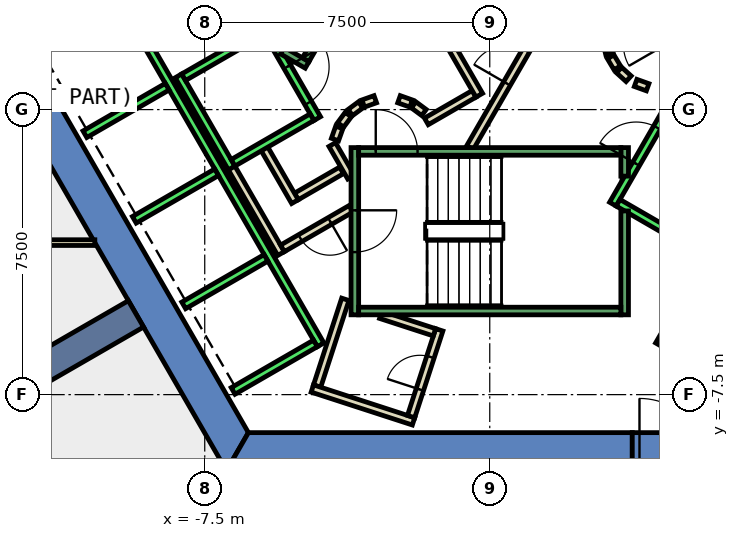
"""IFC4 building model, lengths in metres.
Left out: names, types, materials, properties, quantities, classifications, styles, units other than length and angle.
Written with IfcOpenShell. Run it as: python <this file> out.ifc"""

import sys

from ifc_helpers import new_model, si_unit, direction, frame, frame_2d, origin, place, context, subcontext, project, spatial, polyline, rectangle, outline, extrude, element, fill, save


model = new_model("IFC4")
c1 = context("Model", 3, precision=1e-05, world=origin(), true_north=direction((0.0, 1.0)))
c2 = subcontext(c1, "Body", "Model", "MODEL_VIEW")
j1 = project(units=[si_unit("LENGTHUNIT", "METRE"), si_unit("PLANEANGLEUNIT", "RADIAN")], contexts=[c1])
p1 = place(None, origin())
s1 = spatial("IfcSite", under=j1, at=p1, CompositionType="ELEMENT")
p2 = place(p1, origin())
s2 = spatial("IfcBuilding", under=s1, at=p2, CompositionType="ELEMENT")
p3 = place(p2, frame((0.0, 0.0, 25.0)))
s3 = spatial("IfcBuildingStorey", under=s2, at=p3, CompositionType="ELEMENT", Elevation=25.0)
p4 = place(p3, frame((0.0, 0.0, -0.45)))
e1 = element("IfcWall", 1, at=p4, inside=s3, PredefinedType="SHEAR", context=c2, shape_type="SweptSolid", body=[
    extrude(outline(polyline([(-13.856, 2.5), (-6.928, -9.5), (-6.351, -8.5), (-12.702, 2.5), (-13.856, 2.5)])), origin(), (0.0, 0.0, 1.0), 5.0),
])
p5 = place(p3, frame((0.0, 0.0, -0.45)))
e2 = element("IfcWall", 2, at=p5, inside=s3, PredefinedType="SHEAR", context=c2, shape_type="SweptSolid", body=[
    extrude(outline(polyline([(3.75, -9.5), (3.75, -8.5), (-6.351, -8.5), (-6.928, -9.5), (3.75, -9.5)])), origin(), (0.0, 0.0, 1.0), 5.0),
])
p6 = place(p3, frame((0.0, 0.0, 3.6)))
e3 = element("IfcWall", 3, at=p6, inside=s3, PredefinedType="SHEAR", context=c2, shape_type="SweptSolid", body=[
    extrude(outline(polyline([(5.75, -9.5), (5.75, -8.5), (3.75, -8.5), (3.75, -9.5), (5.75, -9.5)])), origin(), (0.0, 0.0, 1.0), 0.95),
])
p7 = place(p3, frame((-9.31, -5.375, -0.45), z_axis=(0.0, 0.0, 1.0), x_axis=(-0.866017533419, -0.500013631625, 0.0)))
e4 = element("IfcWall", 4, at=p7, inside=s3, PredefinedType="SHEAR", context=c2, shape_type="SweptSolid", body=[
    extrude(rectangle(XDim=9.0, YDim=0.8, at=frame_2d((4.5, 0.0))), origin(), (0.0, 0.0, 1.0), 5.0),
])
p8 = place(p3, frame((-3.9, -1.599, 0.0), z_axis=(0.0, 0.0, 1.0), x_axis=(-0.865969445389, -0.500096910261, 0.0)))
e5 = element("IfcWall", 5, at=p8, inside=s3, PredefinedType="PARTITIONING", context=c2, shape_type="SweptSolid", body=[
    extrude(rectangle(XDim=1.373, YDim=0.2, at=frame_2d((0.687, 0.0))), origin(), (0.0, 0.0, 1.0), 4.55),
])
p9 = place(p3, frame((-5.126, -2.422, 0.0), z_axis=(0.0, 0.0, 1.0), x_axis=(-0.500062241894, 0.865989465428, 0.0)))
e6 = element("IfcWall", 6, at=p9, inside=s3, PredefinedType="PARTITIONING", context=c2, shape_type="SweptSolid", body=[
    extrude(rectangle(XDim=1.7, YDim=0.2, at=frame_2d((0.85, 0.0))), origin(), (0.0, 0.0, 1.0), 4.55),
])
p10 = place(p3, frame((-5.492, -3.788, 0.0), z_axis=(0.0, 0.0, 1.0), x_axis=(-0.500008949224, 0.866020236886, 0.0)))
e7 = element("IfcWall", 7, at=p10, inside=s3, PredefinedType="PARTITIONING", context=c2, shape_type="SweptSolid", body=[
    extrude(rectangle(XDim=2.68, YDim=0.2, at=frame_2d((1.34, 0.0))), origin(), (0.0, 0.0, 1.0), 4.55),
])
p11 = place(p3, frame((-4.145, -0.92, 0.0), z_axis=(0.0, 0.0, 1.0), x_axis=(0.499743786207, -0.866173278362, 0.0)))
e8 = element("IfcWall", 8, at=p11, inside=s3, PredefinedType="PARTITIONING", context=c2, shape_type="SweptSolid", body=[
    extrude(rectangle(XDim=0.991, YDim=0.2, at=frame_2d((0.495, 0.0))), origin(), (0.0, 0.0, 1.0), 4.55),
])
p12 = place(p3, frame((-3.65, -2.61, 0.0), z_axis=(0.0, 0.0, 1.0), x_axis=(-0.866072462134, -0.499918483688, 0.0)))
e9 = element("IfcWall", 9, at=p12, inside=s3, PredefinedType="PARTITIONING", context=c2, shape_type="SweptSolid", body=[
    extrude(rectangle(XDim=2.084, YDim=0.2, at=frame_2d((1.042, 0.0))), origin(), (0.0, 0.0, 1.0), 4.55),
])
p13 = place(p12, frame((0.642, 0.0, 0.0)))
e10 = element("IfcOpeningElement", 10, at=p13, cuts=e9, PredefinedType="OPENING", context=c2, shape_type="SweptSolid", body=[
    extrude(rectangle(XDim=0.9, YDim=2.1, at=frame_2d((0.45, 1.05))), frame((0.0, 0.11, 0.0), z_axis=(0.0, -1.0, 0.0), x_axis=(1.0, 0.0, 0.0)), (0.0, 0.0, 1.0), 0.22),
])
p14 = place(p3, frame((-3.801, -4.992, 0.0), z_axis=(0.0, 0.0, 1.0), x_axis=(-0.309079173229, -0.951036310914, 0.0)))
e11 = element("IfcWall", 11, at=p14, inside=s3, PredefinedType="PARTITIONING", context=c2, shape_type="SweptSolid", body=[
    extrude(rectangle(XDim=2.4, YDim=0.2, at=frame_2d((1.2, 0.0))), origin(), (0.0, 0.0, 1.0), 4.55),
])
p15 = place(p3, frame((-4.669, -7.339, 0.0), z_axis=(0.0, 0.0, 1.0), x_axis=(0.951079555704, -0.308946077369, 0.0)))
e12 = element("IfcWall", 12, at=p15, inside=s3, PredefinedType="PARTITIONING", context=c2, shape_type="SweptSolid", body=[
    extrude(rectangle(XDim=2.8, YDim=0.2, at=frame_2d((1.4, 0.0))), origin(), (0.0, 0.0, 1.0), 4.55),
])
p16 = place(p3, frame((-2.07, -8.078, 0.0), z_axis=(0.0, 0.0, 1.0), x_axis=(0.309171157328, 0.951006411901, 0.0)))
e13 = element("IfcWall", 13, at=p16, inside=s3, PredefinedType="PARTITIONING", context=c2, shape_type="SweptSolid", body=[
    extrude(rectangle(XDim=2.401, YDim=0.2, at=frame_2d((1.2, 0.0))), origin(), (0.0, 0.0, 1.0), 4.55),
])
p17 = place(p16, frame((0.75, 0.0, 0.0)))
e14 = element("IfcOpeningElement", 14, at=p17, cuts=e13, PredefinedType="OPENING", context=c2, shape_type="SweptSolid", body=[
    extrude(rectangle(XDim=0.9, YDim=2.1, at=frame_2d((0.45, 1.05))), frame((0.0, 0.11, 0.0), z_axis=(0.0, -1.0, 0.0), x_axis=(1.0, 0.0, 0.0)), (0.0, 0.0, 1.0), 0.22),
])
p18 = place(p3, frame((-1.455, -5.86, 0.0), z_axis=(0.0, 0.0, 1.0), x_axis=(-0.950892787506, 0.309520446287, 0.0)))
e15 = element("IfcWall", 15, at=p18, inside=s3, PredefinedType="PARTITIONING", context=c2, shape_type="SweptSolid", body=[
    extrude(rectangle(XDim=1.487, YDim=0.2, at=frame_2d((0.743, 0.0))), origin(), (0.0, 0.0, 1.0), 4.55),
])
p19 = place(p3, frame((3.07, 1.786, 0.0), z_axis=(0.0, 0.0, 1.0), x_axis=(0.242705583207, -0.970099994784, 0.0)))
e16 = element("IfcWall", 16, at=p19, inside=s3, PredefinedType="PARTITIONING", context=c2, shape_type="SweptSolid", body=[
    extrude(rectangle(XDim=0.338, YDim=0.2, at=frame_2d((0.169, 0.0))), origin(), (0.0, 0.0, 1.0), 4.55),
])
for number, where, z_axis, x_axis in (
    (17, (3.182, 1.388, 0.0), (0.0, 0.0, 1.0), (0.512, -0.859, 0.0)),
    (18, (3.404, 1.039, 0.0), (0.0, 0.0, 1.0), (0.74, -0.672, 0.0)),
):
    element("IfcWall", number, at=place(p3, frame(where, z_axis=z_axis, x_axis=x_axis)), inside=s3, PredefinedType="PARTITIONING", context=c2, shape_type="SweptSolid", body=[
        extrude(rectangle(XDim=0.338, YDim=0.2, at=frame_2d((0.169, 0.0))), origin(), (0.0, 0.0, 1.0), 4.55),
    ])
p20 = place(p3, frame((3.838, 0.702, 0.0), z_axis=(0.0, 0.0, 1.0), x_axis=(0.941035081519, -0.338308993895, 0.0)))
e19 = element("IfcWall", 19, at=p20, inside=s3, PredefinedType="PARTITIONING", context=c2, shape_type="SweptSolid", body=[
    extrude(rectangle(XDim=0.337, YDim=0.2, at=frame_2d((0.168, 0.0))), origin(), (0.0, 0.0, 1.0), 4.55),
])
p21 = place(p3, frame((-0.52, -1.0, 0.0), z_axis=(0.0, 0.0, 1.0), x_axis=(0.50011622646, 0.865958290007, 0.0)))
e20 = element("IfcWall", 20, at=p21, inside=s3, PredefinedType="PARTITIONING", context=c2, shape_type="SweptSolid", body=[
    extrude(rectangle(XDim=4.991, YDim=0.2, at=frame_2d((2.496, 0.0))), origin(), (0.0, 0.0, 1.0), 4.55),
])
p22 = place(p21, frame((1.945, 0.0, 0.0)))
e21 = element("IfcOpeningElement", 21, at=p22, cuts=e20, PredefinedType="OPENING", context=c2, shape_type="SweptSolid", body=[
    extrude(rectangle(XDim=1.0, YDim=2.1, at=frame_2d((0.5, 1.05))), frame((0.0, 0.11, 0.0), z_axis=(0.0, -1.0, 0.0), x_axis=(1.0, 0.0, 0.0)), (0.0, 0.0, 1.0), 0.22),
])
p23 = place(p3, frame((-0.412, 0.414, 0.0), z_axis=(0.0, 0.0, 1.0), x_axis=(-0.866017369001, -0.500013916395, 0.0)))
e22 = element("IfcWall", 22, at=p23, inside=s3, PredefinedType="PARTITIONING", context=c2, shape_type="SweptSolid", body=[
    extrude(rectangle(XDim=1.45, YDim=0.2, at=frame_2d((0.725, 0.0))), origin(), (0.0, 0.0, 1.0), 4.55),
])
p24 = place(p3, frame((-1.731, -0.077, 0.0), z_axis=(0.0, 0.0, 1.0), x_axis=(-0.804311165252, 0.594208338422, 0.0)))
e23 = element("IfcWall", 23, at=p24, inside=s3, PredefinedType="PARTITIONING", context=c2, shape_type="SweptSolid", body=[
    extrude(rectangle(XDim=0.338, YDim=0.2, at=frame_2d((0.169, 0.0))), origin(), (0.0, 0.0, 1.0), 4.55),
])
p25 = place(p3, frame((-2.07, 0.16, 0.0), z_axis=(0.0, 0.0, 1.0), x_axis=(-0.942199461132, 0.335052496547, 0.0)))
e24 = element("IfcWall", 24, at=p25, inside=s3, PredefinedType="PARTITIONING", context=c2, shape_type="SweptSolid", body=[
    extrude(rectangle(XDim=0.337, YDim=0.2, at=frame_2d((0.169, 0.0))), origin(), (0.0, 0.0, 1.0), 4.55),
])
p26 = place(p3, frame((-3.012, 0.273, 0.0), z_axis=(0.0, 0.0, 1.0), x_axis=(-0.942280615813, -0.334824194261, 0.0)))
e25 = element("IfcWall", 25, at=p26, inside=s3, PredefinedType="PARTITIONING", context=c2, shape_type="SweptSolid", body=[
    extrude(rectangle(XDim=0.338, YDim=0.2, at=frame_2d((0.169, 0.0))), origin(), (0.0, 0.0, 1.0), 4.55),
])
p27 = place(p3, frame((-3.397, 0.124, 0.0), z_axis=(0.0, 0.0, 1.0), x_axis=(-0.804311165252, -0.594208338422, 0.0)))
e26 = element("IfcWall", 26, at=p27, inside=s3, PredefinedType="PARTITIONING", context=c2, shape_type="SweptSolid", body=[
    extrude(rectangle(XDim=0.338, YDim=0.2, at=frame_2d((0.169, 0.0))), origin(), (0.0, 0.0, 1.0), 4.55),
])
p28 = place(p3, frame((-3.723, -0.131, 0.0), z_axis=(0.0, 0.0, 1.0), x_axis=(-0.594675113454, -0.803966112121, 0.0)))
e27 = element("IfcWall", 27, at=p28, inside=s3, PredefinedType="PARTITIONING", context=c2, shape_type="SweptSolid", body=[
    extrude(rectangle(XDim=0.338, YDim=0.2, at=frame_2d((0.169, 0.0))), origin(), (0.0, 0.0, 1.0), 4.55),
])
p29 = place(p3, frame((-3.96, -0.47, 0.0), z_axis=(0.0, 0.0, 1.0), x_axis=(-0.334824194261, -0.942280615813, 0.0)))
e28 = element("IfcWall", 28, at=p29, inside=s3, PredefinedType="PARTITIONING", context=c2, shape_type="SweptSolid", body=[
    extrude(rectangle(XDim=0.338, YDim=0.2, at=frame_2d((0.169, 0.0))), origin(), (0.0, 0.0, 1.0), 4.55),
])
p30 = place(p3, frame((-2.771, 4.7, 0.0), z_axis=(0.0, 0.0, 1.0), x_axis=(0.499969479948, -0.866043023828, 0.0)))
e29 = element("IfcWall", 29, at=p30, inside=s3, PredefinedType="PARTITIONING", context=c2, shape_type="SweptSolid", body=[
    extrude(rectangle(XDim=4.99, YDim=0.2, at=frame_2d((2.495, 0.0))), origin(), (0.0, 0.0, 1.0), 4.55),
])
p31 = place(p30, frame((1.945, 0.0, 0.0)))
e30 = element("IfcOpeningElement", 30, at=p31, cuts=e29, PredefinedType="OPENING", context=c2, shape_type="SweptSolid", body=[
    extrude(rectangle(XDim=1.0, YDim=2.1, at=frame_2d((0.5, 1.05))), frame((0.0, 0.11, 0.0), z_axis=(0.0, -1.0, 0.0), x_axis=(1.0, 0.0, 0.0)), (0.0, 0.0, 1.0), 0.22),
])
p32 = place(p3, frame((-23.777, -3.5, 0.0), z_axis=(0.0, 0.0, 1.0), x_axis=(1.0, 0.0, 0.0)))
e31 = element("IfcWall", 31, at=p32, inside=s3, PredefinedType="PARTITIONING", context=c2, shape_type="SweptSolid", body=[
    extrude(rectangle(XDim=13.385, YDim=0.15, at=frame_2d((6.692, 0.0))), origin(), (0.0, 0.0, 1.0), 4.55),
])
p33 = place(p32, frame((5.83, 0.0, 0.0)))
e32 = element("IfcOpeningElement", 32, at=p33, cuts=e31, PredefinedType="OPENING", context=c2, shape_type="SweptSolid", body=[
    extrude(rectangle(XDim=1.8, YDim=2.1, at=frame_2d((0.9, 1.05))), frame((0.0, 0.085, 0.0), z_axis=(0.0, -1.0, 0.0), x_axis=(1.0, 0.0, 0.0)), (0.0, 0.0, 1.0), 0.17),
])
p34 = place(p3, frame((-5.94, 2.188, 0.0), z_axis=(0.0, 0.0, 1.0), x_axis=(0.49994636267, -0.866056369097, 0.0)))
e33 = element("IfcWall", 33, at=p34, inside=s3, PredefinedType="STANDARD", context=c2, shape_type="SweptSolid", body=[
    extrude(rectangle(XDim=2.8, YDim=0.2, at=frame_2d((1.4, 0.0))), origin(), (0.0, 0.0, 1.0), 4.55),
])
p35 = place(p34, frame((1.225, 0.0, 0.0)))
e34 = element("IfcOpeningElement", 34, at=p35, cuts=e33, PredefinedType="OPENING", context=c2, shape_type="SweptSolid", body=[
    extrude(rectangle(XDim=1.1, YDim=2.1, at=frame_2d((0.55, 1.05))), frame((0.0, 0.11, 0.0), z_axis=(0.0, -1.0, 0.0), x_axis=(1.0, 0.0, 0.0)), (0.0, 0.0, 1.0), 0.22),
])
p36 = place(p3, frame((-8.192, 0.888, 0.0), z_axis=(0.0, 0.0, 1.0), x_axis=(0.49994636267, -0.866056369097, 0.0)))
e35 = element("IfcWall", 35, at=p36, inside=s3, PredefinedType="STANDARD", context=c2, shape_type="SweptSolid", body=[
    extrude(rectangle(XDim=2.8, YDim=0.2, at=frame_2d((1.4, 0.0))), origin(), (0.0, 0.0, 1.0), 4.55),
])
for number, where, z_axis, x_axis in (
    (36, (-5.977, 2.052, 0.0), (0.0, 0.0, 1.0), (-0.866, -0.5, 0.0)),
    (37, (-4.677, -0.2, 0.0), (0.0, 0.0, 1.0), (-0.866, -0.5, 0.0)),
):
    element("IfcWall", number, at=place(p3, frame(where, z_axis=z_axis, x_axis=x_axis)), inside=s3, PredefinedType="STANDARD", context=c2, shape_type="SweptSolid", body=[
        extrude(rectangle(XDim=2.399, YDim=0.2, at=frame_2d((1.2, 0.0))), origin(), (0.0, 0.0, 1.0), 4.55),
    ])
p37 = place(p3, frame((-9.751, 2.99, 0.0), z_axis=(0.0, 0.0, 1.0), x_axis=(0.50000090737, -0.866024879913, 0.0)))
e38 = element("IfcWall", 38, at=p37, inside=s3, PredefinedType="STANDARD", context=c2, shape_type="SweptSolid", body=[
    extrude(rectangle(XDim=10.6, YDim=0.2, at=frame_2d((5.3, 0.0))), origin(), (0.0, 0.0, 1.0), 4.55),
])
for number, where, z_axis, x_axis in (
    (39, (-8.488, 0.602, 0.0), (0.0, 0.0, 1.0), (-0.866, -0.5, 0.0)),
    (40, (-7.188, -1.65, 0.0), (0.0, 0.0, 1.0), (-0.866, -0.5, 0.0)),
    (41, (-5.888, -3.902, 0.0), (0.0, 0.0, 1.0), (-0.866, -0.5, 0.0)),
    (42, (-4.588, -6.153, 0.0), (0.0, 0.0, 1.0), (-0.866, -0.5, 0.0)),
):
    element("IfcWall", number, at=place(p3, frame(where, z_axis=z_axis, x_axis=x_axis)), inside=s3, PredefinedType="STANDARD", context=c2, shape_type="SweptSolid", body=[
        extrude(rectangle(XDim=2.5, YDim=0.2, at=frame_2d((1.25, 0.0))), origin(), (0.0, 0.0, 1.0), 4.55),
    ])
p38 = place(p3, frame((3.24, -2.488, 0.0), z_axis=(0.0, 0.0, 1.0), x_axis=(0.49994636267, 0.866056369097, 0.0)))
e43 = element("IfcWall", 43, at=p38, inside=s3, PredefinedType="STANDARD", context=c2, shape_type="SweptSolid", body=[
    extrude(rectangle(XDim=2.8, YDim=0.2, at=frame_2d((1.4, 0.0))), origin(), (0.0, 0.0, 1.0), 4.55),
])
p39 = place(p38, frame((1.225, 0.0, 0.0)))
e44 = element("IfcOpeningElement", 44, at=p39, cuts=e43, PredefinedType="OPENING", context=c2, shape_type="SweptSolid", body=[
    extrude(rectangle(XDim=1.1, YDim=2.1, at=frame_2d((0.55, 1.05))), frame((0.0, 0.11, 0.0), z_axis=(0.0, -1.0, 0.0), x_axis=(1.0, 0.0, 0.0)), (0.0, 0.0, 1.0), 0.22),
])
p40 = place(p3, frame((3.377, -2.452, 0.0), z_axis=(0.0, 0.0, 1.0), x_axis=(0.865955154139, -0.50012165622, 0.0)))
e45 = element("IfcWall", 45, at=p40, inside=s3, PredefinedType="STANDARD", context=c2, shape_type="SweptSolid", body=[
    extrude(rectangle(XDim=2.4, YDim=0.2, at=frame_2d((1.2, 0.0))), origin(), (0.0, 0.0, 1.0), 4.55),
])
p41 = place(p3, frame((4.451, -6.19, 0.0), z_axis=(0.0, 0.0, 1.0), x_axis=(0.50000090737, 0.866024879913, 0.0)))
e46 = element("IfcWall", 46, at=p41, inside=s3, PredefinedType="STANDARD", context=c2, shape_type="SweptSolid", body=[
    extrude(rectangle(XDim=10.6, YDim=0.2, at=frame_2d((5.3, 0.0))), origin(), (0.0, 0.0, 1.0), 4.55),
])
p42 = place(p3, frame((-3.55, -1.0, 0.0), z_axis=(0.0, 0.0, 1.0), x_axis=(0.0, -1.0, 0.0)))
e47 = element("IfcWall", 47, at=p42, inside=s3, PredefinedType="STANDARD", context=c2, shape_type="SweptSolid", body=[
    extrude(rectangle(XDim=4.4, YDim=0.2, at=frame_2d((2.2, 0.0))), origin(), (0.0, 0.0, 1.0), 4.55),
])
p43 = place(p42, frame((1.65, 0.0, 0.0)))
e48 = element("IfcOpeningElement", 48, at=p43, cuts=e47, PredefinedType="OPENING", context=c2, shape_type="SweptSolid", body=[
    extrude(rectangle(XDim=1.1, YDim=2.2, at=frame_2d((0.55, 1.1))), frame((0.0, 0.11, 0.0), z_axis=(0.0, -1.0, 0.0), x_axis=(1.0, 0.0, 0.0)), (0.0, 0.0, 1.0), 0.22),
])
p44 = place(p3, frame((3.55, -2.667, 0.0), z_axis=(0.0, 0.0, 1.0), x_axis=(0.0, -1.0, 0.0)))
e49 = element("IfcWall", 49, at=p44, inside=s3, PredefinedType="STANDARD", context=c2, shape_type="SweptSolid", body=[
    extrude(rectangle(XDim=2.733, YDim=0.2, at=frame_2d((1.366, 0.0))), origin(), (0.0, 0.0, 1.0), 4.55),
])
p45 = place(p3, frame((3.55, -1.0, 0.0), z_axis=(0.0, 0.0, 1.0), x_axis=(0.0, -1.0, 0.0)))
e50 = element("IfcWall", 50, at=p45, inside=s3, PredefinedType="STANDARD", context=c2, shape_type="SweptSolid", body=[
    extrude(rectangle(XDim=0.751, YDim=0.2, at=frame_2d((0.375, 0.0))), origin(), (0.0, 0.0, 1.0), 4.55),
])
p46 = place(p3, frame((-3.45, -1.1, 0.0), z_axis=(0.0, 0.0, 1.0), x_axis=(1.0, 0.0, 0.0)))
e51 = element("IfcWall", 51, at=p46, inside=s3, PredefinedType="STANDARD", context=c2, shape_type="SweptSolid", body=[
    extrude(rectangle(XDim=6.9, YDim=0.2, at=frame_2d((3.45, 0.0))), origin(), (0.0, 0.0, 1.0), 4.55),
])
p47 = place(p46, frame((0.45, 0.0, 0.0)))
e52 = element("IfcOpeningElement", 52, at=p47, cuts=e51, PredefinedType="OPENING", context=c2, shape_type="SweptSolid", body=[
    extrude(rectangle(XDim=1.1, YDim=2.2, at=frame_2d((0.55, 1.1))), frame((0.0, 0.11, 0.0), z_axis=(0.0, -1.0, 0.0), x_axis=(1.0, 0.0, 0.0)), (0.0, 0.0, 1.0), 0.22),
])
p48 = place(p3, frame((-3.45, -5.3, 0.0), z_axis=(0.0, 0.0, 1.0), x_axis=(1.0, 0.0, 0.0)))
e53 = element("IfcWall", 53, at=p48, inside=s3, PredefinedType="STANDARD", context=c2, shape_type="SweptSolid", body=[
    extrude(rectangle(XDim=6.9, YDim=0.2, at=frame_2d((3.45, 0.0))), origin(), (0.0, 0.0, 1.0), 4.55),
])
p49 = place(p3, frame((4.843, 1.312, 0.0), z_axis=(0.0, 0.0, 1.0), x_axis=(-0.499963383562, 0.866046543262, 0.0)))
e54 = element("IfcWall", 54, at=p49, inside=s3, PredefinedType="STANDARD", context=c2, shape_type="SweptSolid", body=[
    extrude(rectangle(XDim=6.9, YDim=0.2, at=frame_2d((3.45, 0.0))), origin(), (0.0, 0.0, 1.0), 4.55),
])
p50 = place(p49, frame((0.45, 0.0, 0.0)))
e55 = element("IfcOpeningElement", 55, at=p50, cuts=e54, PredefinedType="OPENING", context=c2, shape_type="SweptSolid", body=[
    extrude(rectangle(XDim=1.1, YDim=2.2, at=frame_2d((0.55, 1.1))), frame((0.0, 0.11, 0.0), z_axis=(0.0, -1.0, 0.0), x_axis=(1.0, 0.0, 0.0)), (0.0, 0.0, 1.0), 0.22),
])
p51 = place(p3, frame((-4.806, 1.176, 0.0), z_axis=(0.0, 0.0, 1.0), x_axis=(-0.866558586415, 0.499075361355, 0.0)))
e56 = element("IfcWall", 56, at=p51, inside=s3, PredefinedType="STANDARD", context=c2, shape_type="SweptSolid", body=[
    extrude(rectangle(XDim=0.751, YDim=0.2, at=frame_2d((0.376, 0.0))), origin(), (0.0, 0.0, 1.0), 4.55),
])
p52 = place(p3, frame((-1.393, 7.288, 0.0), z_axis=(0.0, 0.0, 1.0), x_axis=(-0.499963383562, -0.866046543262, 0.0)))
e57 = element("IfcWall", 57, at=p52, inside=s3, PredefinedType="STANDARD", context=c2, shape_type="SweptSolid", body=[
    extrude(rectangle(XDim=6.9, YDim=0.2, at=frame_2d((3.45, 0.0))), origin(), (0.0, 0.0, 1.0), 4.55),
])
p53 = place(p52, frame((0.45, 0.0, 0.0)))
e58 = element("IfcOpeningElement", 58, at=p53, cuts=e57, PredefinedType="OPENING", context=c2, shape_type="SweptSolid", body=[
    extrude(rectangle(XDim=1.1, YDim=2.2, at=frame_2d((0.55, 1.1))), frame((0.0, 0.11, 0.0), z_axis=(0.0, -1.0, 0.0), x_axis=(1.0, 0.0, 0.0)), (0.0, 0.0, 1.0), 0.22),
])
p54 = place(p22, origin())
e59 = element("IfcDoor", 59, at=p54, inside=s3, OperationType="SINGLE_SWING_LEFT", PredefinedType="DOOR", context=c2, shape_type="SweptSolid", body=[
    extrude(rectangle(XDim=1.0, YDim=2.1, at=frame_2d((0.5, 1.05))), frame((0.0, 0.025, 0.0), z_axis=(0.0, -1.0, 0.0), x_axis=(1.0, 0.0, 0.0)), (0.0, 0.0, 1.0), 0.05),
])
fill(e21, e59)
p55 = place(p13, origin())
e60 = element("IfcDoor", 60, at=p55, inside=s3, OperationType="SINGLE_SWING_LEFT", PredefinedType="DOOR", context=c2, shape_type="SweptSolid", body=[
    extrude(rectangle(XDim=0.9, YDim=2.1, at=frame_2d((0.45, 1.05))), frame((0.0, 0.025, 0.0), z_axis=(0.0, -1.0, 0.0), x_axis=(1.0, 0.0, 0.0)), (0.0, 0.0, 1.0), 0.05),
])
fill(e10, e60)
p56 = place(p17, origin())
e61 = element("IfcDoor", 61, at=p56, inside=s3, OperationType="SINGLE_SWING_LEFT", PredefinedType="DOOR", context=c2, shape_type="SweptSolid", body=[
    extrude(rectangle(XDim=0.9, YDim=2.1, at=frame_2d((0.45, 1.05))), frame((0.0, 0.025, 0.0), z_axis=(0.0, -1.0, 0.0), x_axis=(1.0, 0.0, 0.0)), (0.0, 0.0, 1.0), 0.05),
])
fill(e14, e61)
p57 = place(p39, origin())
e62 = element("IfcDoor", 62, at=p57, inside=s3, OperationType="SLIDING_TO_LEFT", PredefinedType="DOOR", context=c2, shape_type="SweptSolid", body=[
    extrude(rectangle(XDim=1.1, YDim=2.1, at=frame_2d((0.55, 1.05))), frame((0.0, 0.025, 0.0), z_axis=(0.0, -1.0, 0.0), x_axis=(1.0, 0.0, 0.0)), (0.0, 0.0, 1.0), 0.05),
])
fill(e44, e62)
p58 = place(p35, origin())
e63 = element("IfcDoor", 63, at=p58, inside=s3, OperationType="SLIDING_TO_LEFT", PredefinedType="DOOR", context=c2, shape_type="SweptSolid", body=[
    extrude(rectangle(XDim=1.1, YDim=2.1, at=frame_2d((0.55, 1.05))), frame((0.0, 0.025, 0.0), z_axis=(0.0, -1.0, 0.0), x_axis=(1.0, 0.0, 0.0)), (0.0, 0.0, 1.0), 0.05),
])
fill(e34, e63)
p59 = place(p47, origin())
e64 = element("IfcDoor", 64, at=p59, inside=s3, OperationType="SINGLE_SWING_LEFT", PredefinedType="DOOR", context=c2, shape_type="SweptSolid", body=[
    extrude(rectangle(XDim=1.1, YDim=2.2, at=frame_2d((0.55, 1.1))), frame((0.0, 0.025, 0.0), z_axis=(0.0, -1.0, 0.0), x_axis=(1.0, 0.0, 0.0)), (0.0, 0.0, 1.0), 0.05),
])
fill(e52, e64)
p60 = place(p43, origin())
e65 = element("IfcDoor", 65, at=p60, inside=s3, OperationType="SINGLE_SWING_LEFT", PredefinedType="DOOR", context=c2, shape_type="SweptSolid", body=[
    extrude(rectangle(XDim=1.1, YDim=2.2, at=frame_2d((0.55, 1.1))), frame((0.0, 0.025, 0.0), z_axis=(0.0, -1.0, 0.0), x_axis=(1.0, 0.0, 0.0)), (0.0, 0.0, 1.0), 0.05),
])
fill(e48, e65)
save(model, sys.argv[1])
